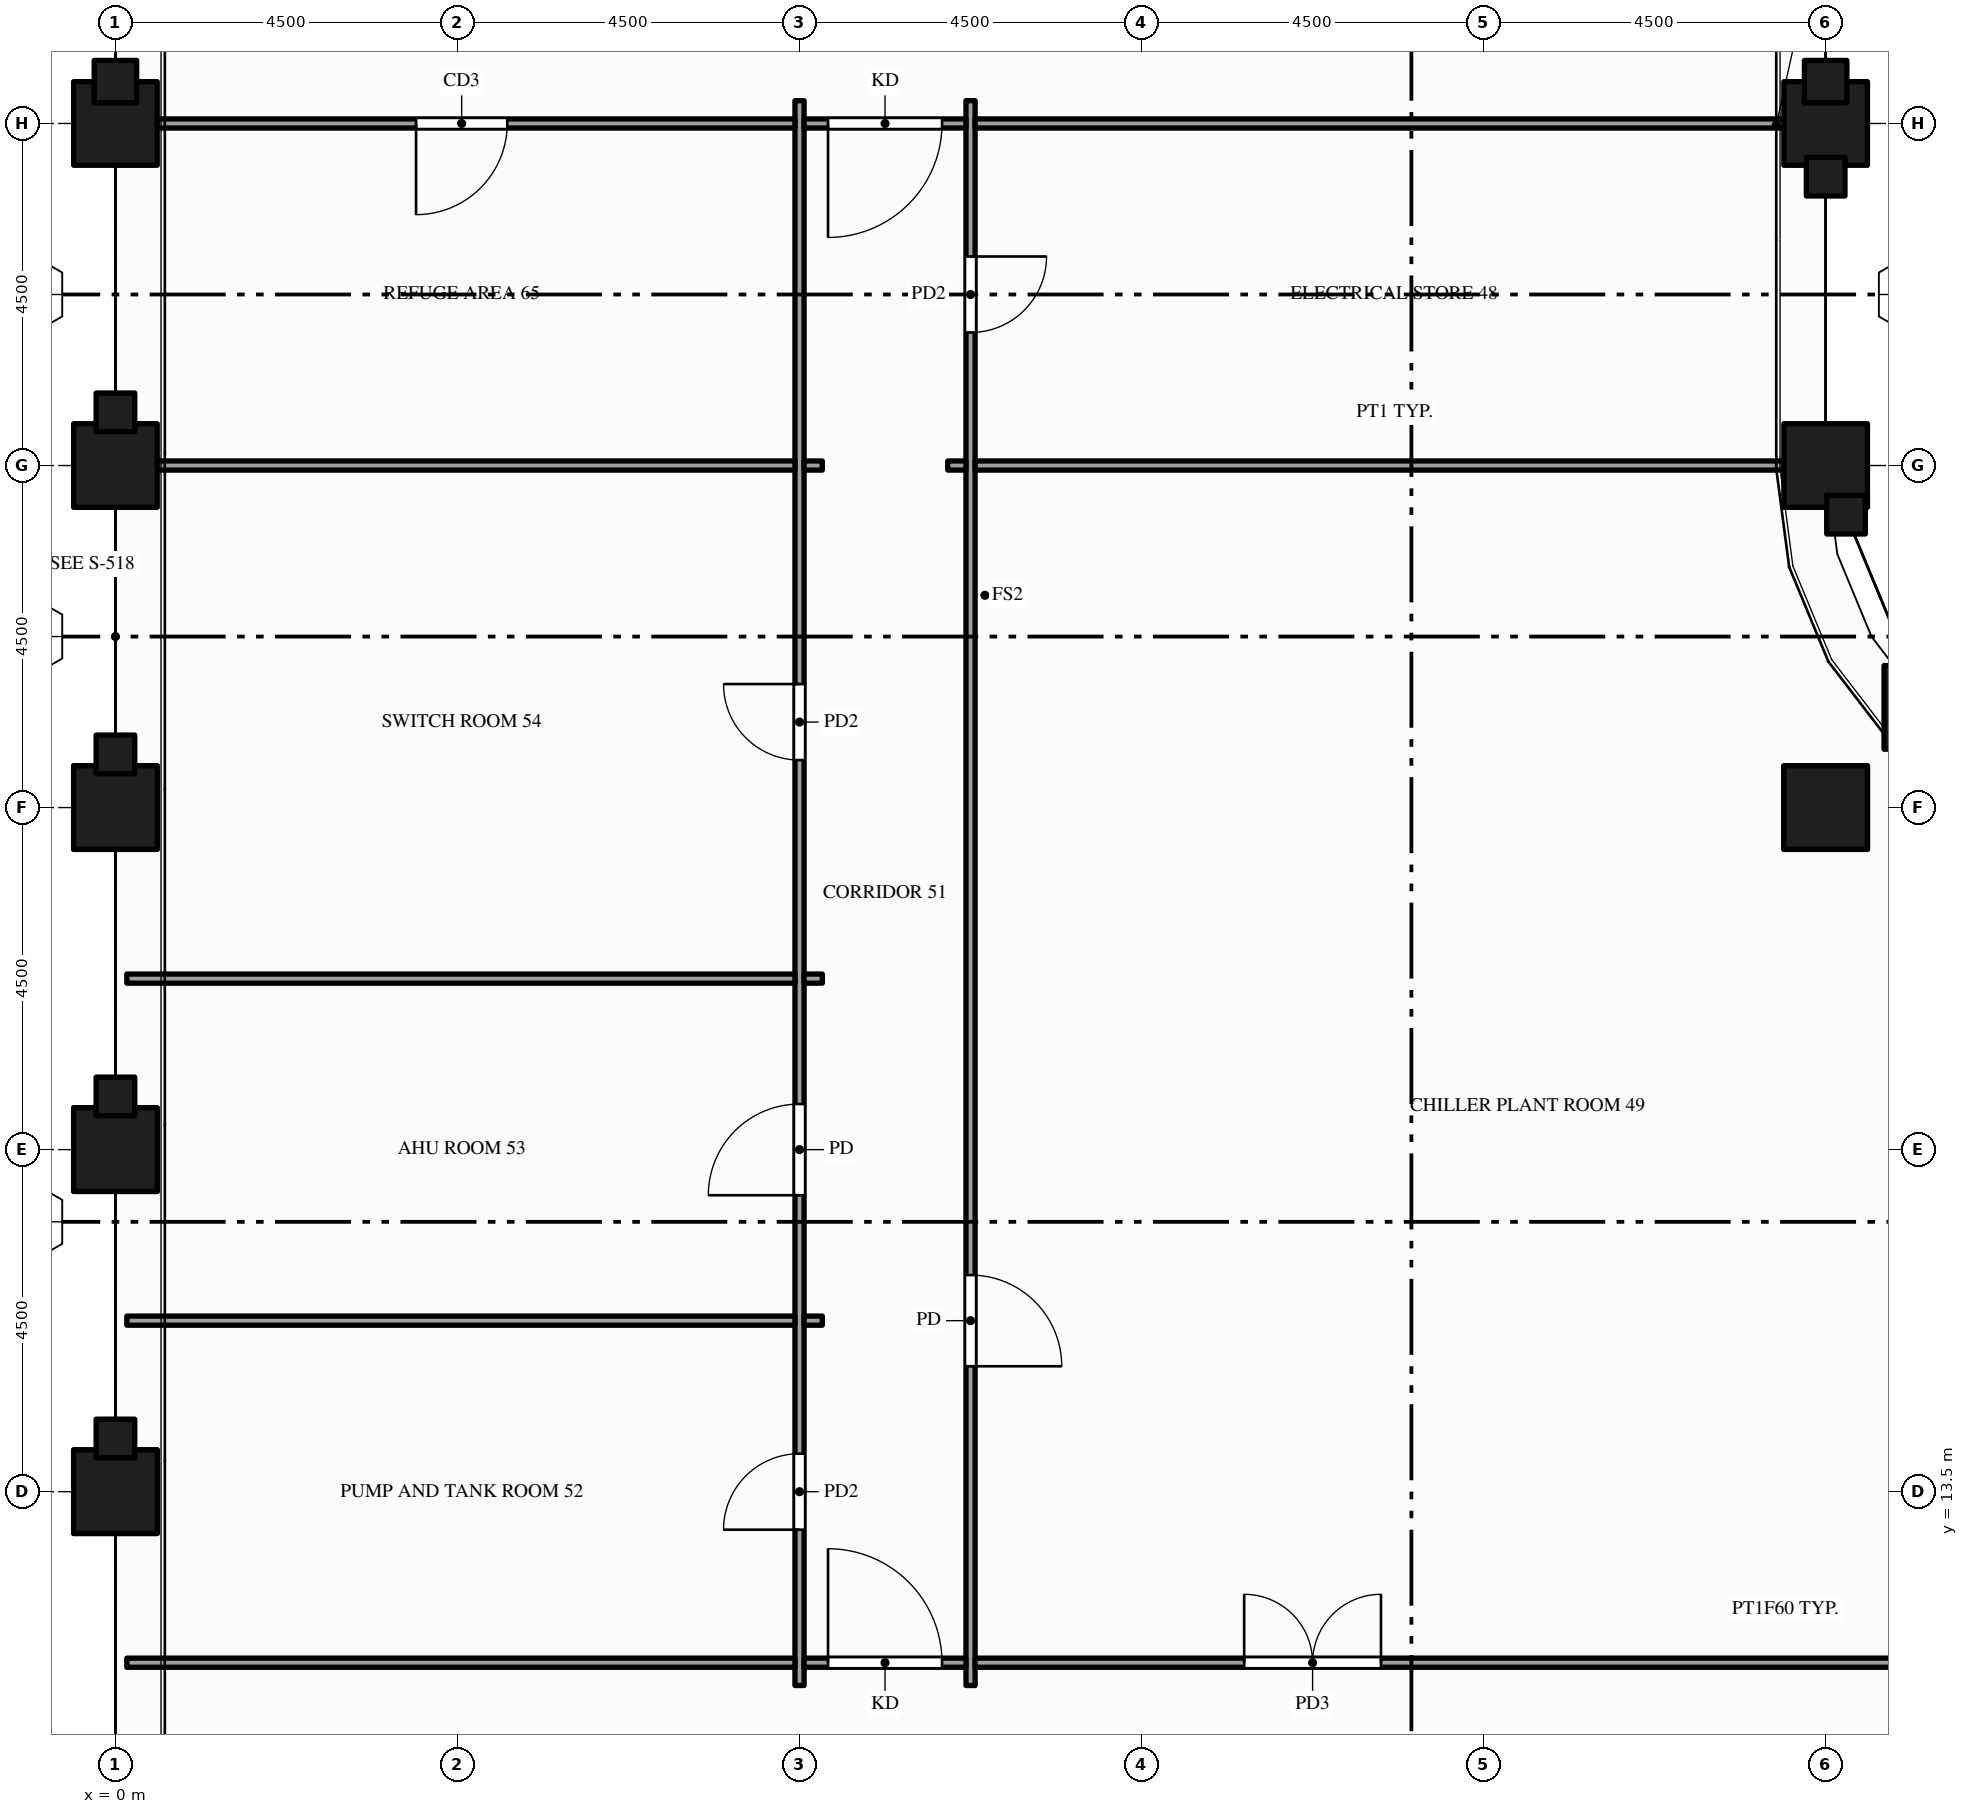
"""IFC4 building model, lengths in metres.
Left out: names, types, materials, properties, quantities, classifications, styles, units other than length and angle.
Written with IfcOpenShell. Run it as: python <this file> out.ifc"""

import sys

from ifc_helpers import new_model, si_unit, direction, frame, frame_2d, origin, origin_2d, place, context, subcontext, project, spatial, rectangle, hollow_rectangle, extrude, element, fill, save


model = new_model("IFC4")
c1 = context("Model", 3, precision=1e-05, world=origin(), true_north=direction((0.0, 1.0)))
c2 = subcontext(c1, "Body", "Model", "MODEL_VIEW")
j1 = project(units=[si_unit("LENGTHUNIT", "METRE"), si_unit("PLANEANGLEUNIT", "RADIAN")], contexts=[c1])
p1 = place(None, origin())
s1 = spatial("IfcSite", under=j1, at=p1, CompositionType="ELEMENT")
p2 = place(p1, origin())
s2 = spatial("IfcBuilding", under=s1, at=p2, CompositionType="ELEMENT")
p3 = place(p2, frame((0.0, 0.0, 77.0)))
s3 = spatial("IfcBuildingStorey", under=s2, at=p3, CompositionType="ELEMENT", Elevation=77.0)
p4 = place(p3, frame((0.0, 13.5, -0.25), z_axis=(0.0, 0.0, 1.0), x_axis=(1.0, 0.0, 0.0)))
e1 = element("IfcColumn", 1, at=p4, inside=s3, PredefinedType="COLUMN", context=c2, shape_type="SweptSolid", body=[
    extrude(hollow_rectangle(XDim=1.1, YDim=1.1, WallThickness=0.06, at=origin_2d()), origin(), (0.0, 0.0, 1.0), 4.6),
])
p5 = place(p3, frame((0.0, 13.5, 4.35), z_axis=(0.0, 0.0, 1.0), x_axis=(1.0, 0.0, 0.0)))
e2 = element("IfcColumn", 2, at=p5, inside=s3, PredefinedType="COLUMN", context=c2, shape_type="SweptSolid", body=[
    extrude(rectangle(XDim=1.1, YDim=1.1, at=origin_2d()), origin(), (0.0, 0.0, 1.0), 1.5),
])
p6 = place(p3, frame((0.0, 18.0, -0.25), z_axis=(0.0, 0.0, 1.0), x_axis=(1.0, 0.0, 0.0)))
e3 = element("IfcColumn", 3, at=p6, inside=s3, PredefinedType="COLUMN", context=c2, shape_type="SweptSolid", body=[
    extrude(hollow_rectangle(XDim=1.1, YDim=1.1, WallThickness=0.06, at=origin_2d()), origin(), (0.0, 0.0, 1.0), 4.6),
])
p7 = place(p3, frame((0.0, 18.0, 4.35), z_axis=(0.0, 0.0, 1.0), x_axis=(1.0, 0.0, 0.0)))
e4 = element("IfcColumn", 4, at=p7, inside=s3, PredefinedType="COLUMN", context=c2, shape_type="SweptSolid", body=[
    extrude(rectangle(XDim=1.1, YDim=1.1, at=origin_2d()), origin(), (0.0, 0.0, 1.0), 1.5),
])
p8 = place(p3, frame((0.0, 22.5, -0.25), z_axis=(0.0, 0.0, 1.0), x_axis=(1.0, 0.0, 0.0)))
e5 = element("IfcColumn", 5, at=p8, inside=s3, PredefinedType="COLUMN", context=c2, shape_type="SweptSolid", body=[
    extrude(hollow_rectangle(XDim=1.1, YDim=1.1, WallThickness=0.06, at=origin_2d()), origin(), (0.0, 0.0, 1.0), 4.6),
])
p9 = place(p3, frame((0.0, 22.5, 4.35), z_axis=(0.0, 0.0, 1.0), x_axis=(1.0, 0.0, 0.0)))
e6 = element("IfcColumn", 6, at=p9, inside=s3, PredefinedType="COLUMN", context=c2, shape_type="SweptSolid", body=[
    extrude(rectangle(XDim=1.1, YDim=1.1, at=origin_2d()), origin(), (0.0, 0.0, 1.0), 1.5),
])
for number, where, z_axis, x_axis in (
    (7, (0.0, 27.0, -0.25), (0.0, 0.0, 1.0), (1.0, 0.0, 0.0)),
    (8, (0.0, 31.5, -0.25), (0.0, 0.0, 1.0), (1.0, 0.0, 0.0)),
):
    element("IfcColumn", number, at=place(p3, frame(where, z_axis=z_axis, x_axis=x_axis)), inside=s3, PredefinedType="COLUMN", context=c2, shape_type="SweptSolid", body=[
        extrude(hollow_rectangle(XDim=1.1, YDim=1.1, WallThickness=0.06, at=origin_2d()), origin(), (0.0, 0.0, 1.0), 6.1),
    ])
p10 = place(p3, frame((22.5, 22.5, -0.25), z_axis=(0.0, 0.0, 1.0), x_axis=(1.0, 0.0, 0.0)))
e9 = element("IfcColumn", 9, at=p10, inside=s3, PredefinedType="COLUMN", context=c2, shape_type="SweptSolid", body=[
    extrude(hollow_rectangle(XDim=1.1, YDim=1.1, WallThickness=0.06, at=origin_2d()), origin(), (0.0, 0.0, 1.0), 4.6),
])
p11 = place(p3, frame((22.5, 22.5, 4.35), z_axis=(0.0, 0.0, 1.0), x_axis=(1.0, 0.0, 0.0)))
e10 = element("IfcColumn", 10, at=p11, inside=s3, PredefinedType="COLUMN", context=c2, shape_type="SweptSolid", body=[
    extrude(rectangle(XDim=1.1, YDim=1.1, at=origin_2d()), origin(), (0.0, 0.0, 1.0), 1.5),
])
for number, where, z_axis, x_axis in (
    (11, (22.5, 27.0, -0.25), (0.0, 0.0, 1.0), (1.0, 0.0, 0.0)),
    (12, (22.5, 31.5, -0.25), (0.0, 0.0, 1.0), (1.0, 0.0, 0.0)),
    (13, (23.818, 23.818, -0.25), (0.0, 0.0, 1.0), (1.0, 0.0, 0.0)),
):
    element("IfcColumn", number, at=place(p3, frame(where, z_axis=z_axis, x_axis=x_axis)), inside=s3, PredefinedType="COLUMN", context=c2, shape_type="SweptSolid", body=[
        extrude(hollow_rectangle(XDim=1.1, YDim=1.1, WallThickness=0.06, at=origin_2d()), origin(), (0.0, 0.0, 1.0), 6.1),
    ])
p12 = place(p3, frame((9.0, 10.95, 0.0), z_axis=(0.0, 0.0, 1.0), x_axis=(0.0, 1.0, 0.0)))
e14 = element("IfcWall", 14, at=p12, inside=s3, PredefinedType="PARTITIONING", context=c2, shape_type="SweptSolid", body=[
    extrude(rectangle(XDim=20.85, YDim=0.12, at=frame_2d((10.425, 0.0))), origin(), (0.0, 0.0, 1.0), 4.6),
])
p13 = place(p12, frame((2.05, 0.0, 0.0)))
e15 = element("IfcOpeningElement", 15, at=p13, cuts=e14, PredefinedType="OPENING", context=c2, shape_type="SweptSolid", body=[
    extrude(rectangle(XDim=1.0, YDim=2.1, at=frame_2d((0.5, 1.05))), frame((0.0, 0.07, 0.0), z_axis=(0.0, -1.0, 0.0), x_axis=(1.0, 0.0, 0.0)), (0.0, 0.0, 1.0), 0.14),
])
p14 = place(p12, frame((6.45, 0.0, 0.0)))
e16 = element("IfcOpeningElement", 16, at=p14, cuts=e14, PredefinedType="OPENING", context=c2, shape_type="SweptSolid", body=[
    extrude(rectangle(XDim=1.2, YDim=2.1, at=frame_2d((0.6, 1.05))), frame((0.0, 0.07, 0.0), z_axis=(0.0, -1.0, 0.0), x_axis=(1.0, 0.0, 0.0)), (0.0, 0.0, 1.0), 0.14),
])
p15 = place(p12, frame((12.175, 0.0, 0.0)))
e17 = element("IfcOpeningElement", 17, at=p15, cuts=e14, PredefinedType="OPENING", context=c2, shape_type="SweptSolid", body=[
    extrude(rectangle(XDim=1.0, YDim=2.1, at=frame_2d((0.5, 1.05))), frame((0.0, 0.07, 0.0), z_axis=(0.0, -1.0, 0.0), x_axis=(1.0, 0.0, 0.0)), (0.0, 0.0, 1.0), 0.14),
])
p16 = place(p3, frame((11.25, 10.95, 0.0), z_axis=(0.0, 0.0, 1.0), x_axis=(0.0, 1.0, 0.0)))
e18 = element("IfcWall", 18, at=p16, inside=s3, PredefinedType="PARTITIONING", context=c2, shape_type="SweptSolid", body=[
    extrude(rectangle(XDim=20.85, YDim=0.12, at=frame_2d((10.425, 0.0))), origin(), (0.0, 0.0, 1.0), 4.6),
])
p17 = place(p16, frame((17.8, 0.0, 0.0)))
e19 = element("IfcOpeningElement", 19, at=p17, cuts=e18, PredefinedType="OPENING", context=c2, shape_type="SweptSolid", body=[
    extrude(rectangle(XDim=1.0, YDim=2.1, at=frame_2d((0.5, 1.05))), frame((0.0, 0.07, 0.0), z_axis=(0.0, -1.0, 0.0), x_axis=(1.0, 0.0, 0.0)), (0.0, 0.0, 1.0), 0.14),
])
p18 = place(p16, frame((4.2, 0.0, 0.0)))
e20 = element("IfcOpeningElement", 20, at=p18, cuts=e18, PredefinedType="OPENING", context=c2, shape_type="SweptSolid", body=[
    extrude(rectangle(XDim=1.2, YDim=2.1, at=frame_2d((0.6, 1.05))), frame((0.0, 0.07, 0.0), z_axis=(0.0, -1.0, 0.0), x_axis=(1.0, 0.0, 0.0)), (0.0, 0.0, 1.0), 0.14),
])
p19 = place(p3, frame((0.15, 11.25, 0.0), z_axis=(0.0, 0.0, 1.0), x_axis=(1.0, 0.0, 0.0)))
e21 = element("IfcWall", 21, at=p19, inside=s3, PredefinedType="PARTITIONING", context=c2, shape_type="SweptSolid", body=[
    extrude(rectangle(XDim=8.79, YDim=0.12, at=frame_2d((4.395, 0.0))), origin(), (0.0, 0.0, 1.0), 4.938),
])
p20 = place(p3, frame((9.06, 11.25, 0.0), z_axis=(0.0, 0.0, 1.0), x_axis=(1.0, 0.0, 0.0)))
e22 = element("IfcWall", 22, at=p20, inside=s3, PredefinedType="PARTITIONING", context=c2, shape_type="SweptSolid", body=[
    extrude(rectangle(XDim=2.13, YDim=0.12, at=frame_2d((1.065, 0.0))), origin(), (0.0, 0.0, 1.0), 4.938),
])
p21 = place(p20, frame((0.315, 0.0, 0.0)))
e23 = element("IfcOpeningElement", 23, at=p21, cuts=e22, PredefinedType="OPENING", context=c2, shape_type="SweptSolid", body=[
    extrude(rectangle(XDim=1.5, YDim=2.1, at=frame_2d((0.75, 1.05))), frame((0.0, 0.07, 0.0), z_axis=(0.0, -1.0, 0.0), x_axis=(1.0, 0.0, 0.0)), (0.0, 0.0, 1.0), 0.14),
])
p22 = place(p3, frame((11.31, 11.25, 0.0), z_axis=(0.0, 0.0, 1.0), x_axis=(1.0, 0.0, 0.0)))
e24 = element("IfcWall", 24, at=p22, inside=s3, PredefinedType="PARTITIONING", context=c2, shape_type="SweptSolid", body=[
    extrude(rectangle(XDim=15.63, YDim=0.12, at=frame_2d((7.815, 0.0))), origin(), (0.0, 0.0, 1.0), 4.938),
])
p23 = place(p22, frame((3.54, 0.0, 0.0)))
e25 = element("IfcOpeningElement", 25, at=p23, cuts=e24, PredefinedType="OPENING", context=c2, shape_type="SweptSolid", body=[
    extrude(rectangle(XDim=1.8, YDim=2.1, at=frame_2d((0.9, 1.05))), frame((0.0, 0.07, 0.0), z_axis=(0.0, -1.0, 0.0), x_axis=(1.0, 0.0, 0.0)), (0.0, 0.0, 1.0), 0.14),
])
p24 = place(p3, frame((0.15, 15.75, 0.0), z_axis=(0.0, 0.0, 1.0), x_axis=(1.0, 0.0, 0.0)))
e26 = element("IfcWall", 26, at=p24, inside=s3, PredefinedType="PARTITIONING", context=c2, shape_type="SweptSolid", body=[
    extrude(rectangle(XDim=8.79, YDim=0.12, at=frame_2d((4.395, 0.0))), origin(), (0.0, 0.0, 1.0), 4.938),
])
p25 = place(p3, frame((9.06, 15.75, 0.0), z_axis=(0.0, 0.0, 1.0), x_axis=(1.0, 0.0, 0.0)))
e27 = element("IfcWall", 27, at=p25, inside=s3, PredefinedType="PARTITIONING", context=c2, shape_type="SweptSolid", body=[
    extrude(rectangle(XDim=0.24, YDim=0.12, at=frame_2d((0.12, 0.0))), origin(), (0.0, 0.0, 1.0), 4.938),
])
p26 = place(p3, frame((0.15, 20.25, 0.0), z_axis=(0.0, 0.0, 1.0), x_axis=(1.0, 0.0, 0.0)))
e28 = element("IfcWall", 28, at=p26, inside=s3, PredefinedType="PARTITIONING", context=c2, shape_type="SweptSolid", body=[
    extrude(rectangle(XDim=8.79, YDim=0.12, at=frame_2d((4.395, 0.0))), origin(), (0.0, 0.0, 1.0), 4.938),
])
p27 = place(p3, frame((9.06, 20.25, 0.0), z_axis=(0.0, 0.0, 1.0), x_axis=(1.0, 0.0, 0.0)))
e29 = element("IfcWall", 29, at=p27, inside=s3, PredefinedType="PARTITIONING", context=c2, shape_type="SweptSolid", body=[
    extrude(rectangle(XDim=0.24, YDim=0.12, at=frame_2d((0.12, 0.0))), origin(), (0.0, 0.0, 1.0), 4.938),
])
p28 = place(p3, frame((0.15, 27.0, 0.0), z_axis=(0.0, 0.0, 1.0), x_axis=(1.0, 0.0, 0.0)))
e30 = element("IfcWall", 30, at=p28, inside=s3, PredefinedType="PARTITIONING", context=c2, shape_type="SweptSolid", body=[
    extrude(rectangle(XDim=8.79, YDim=0.12, at=frame_2d((4.395, 0.0))), origin(), (0.0, 0.0, 1.0), 4.45),
])
for number, where, z_axis, x_axis in (
    (31, (9.06, 27.0, 0.0), (0.0, 0.0, 1.0), (1.0, 0.0, 0.0)),
    (32, (10.95, 27.0, 0.0), (0.0, 0.0, 1.0), (1.0, 0.0, 0.0)),
):
    element("IfcWall", number, at=place(p3, frame(where, z_axis=z_axis, x_axis=x_axis)), inside=s3, PredefinedType="PARTITIONING", context=c2, shape_type="SweptSolid", body=[
        extrude(rectangle(XDim=0.24, YDim=0.12, at=frame_2d((0.12, 0.0))), origin(), (0.0, 0.0, 1.0), 4.938),
    ])
p29 = place(p3, frame((11.31, 27.0, 0.0), z_axis=(0.0, 0.0, 1.0), x_axis=(1.0, 0.0, 0.0)))
e33 = element("IfcWall", 33, at=p29, inside=s3, PredefinedType="PARTITIONING", context=c2, shape_type="SweptSolid", body=[
    extrude(rectangle(XDim=11.04, YDim=0.12, at=frame_2d((5.52, 0.0))), origin(), (0.0, 0.0, 1.0), 4.938),
])
p30 = place(p3, frame((0.15, 31.5, 0.0), z_axis=(0.0, 0.0, 1.0), x_axis=(1.0, 0.0, 0.0)))
e34 = element("IfcWall", 34, at=p30, inside=s3, PredefinedType="PARTITIONING", context=c2, shape_type="SweptSolid", body=[
    extrude(rectangle(XDim=8.79, YDim=0.12, at=frame_2d((4.395, 0.0))), origin(), (0.0, 0.0, 1.0), 4.45),
])
p31 = place(p30, frame((3.805, 0.0, 0.0)))
e35 = element("IfcOpeningElement", 35, at=p31, cuts=e34, PredefinedType="OPENING", context=c2, shape_type="SweptSolid", body=[
    extrude(rectangle(XDim=1.2, YDim=2.1, at=frame_2d((0.6, 1.05))), frame((0.0, 0.07, 0.0), z_axis=(0.0, -1.0, 0.0), x_axis=(1.0, 0.0, 0.0)), (0.0, 0.0, 1.0), 0.14),
])
p32 = place(p3, frame((9.06, 31.5, 0.0), z_axis=(0.0, 0.0, 1.0), x_axis=(1.0, 0.0, 0.0)))
e36 = element("IfcWall", 36, at=p32, inside=s3, PredefinedType="PARTITIONING", context=c2, shape_type="SweptSolid", body=[
    extrude(rectangle(XDim=2.13, YDim=0.12, at=frame_2d((1.065, 0.0))), origin(), (0.0, 0.0, 1.0), 4.938),
])
p33 = place(p32, frame((0.315, 0.0, 0.0)))
e37 = element("IfcOpeningElement", 37, at=p33, cuts=e36, PredefinedType="OPENING", context=c2, shape_type="SweptSolid", body=[
    extrude(rectangle(XDim=1.5, YDim=2.1, at=frame_2d((0.75, 1.05))), frame((0.0, 0.07, 0.0), z_axis=(0.0, -1.0, 0.0), x_axis=(1.0, 0.0, 0.0)), (0.0, 0.0, 1.0), 0.14),
])
p34 = place(p3, frame((11.31, 31.5, 0.0), z_axis=(0.0, 0.0, 1.0), x_axis=(1.0, 0.0, 0.0)))
e38 = element("IfcWall", 38, at=p34, inside=s3, PredefinedType="PARTITIONING", context=c2, shape_type="SweptSolid", body=[
    extrude(rectangle(XDim=11.04, YDim=0.12, at=frame_2d((5.52, 0.0))), origin(), (0.0, 0.0, 1.0), 4.938),
])
p35 = place(p23, origin())
e39 = element("IfcDoor", 39, at=p35, inside=s3, OperationType="DOUBLE_DOOR_SINGLE_SWING", PredefinedType="DOOR", context=c2, shape_type="SweptSolid", body=[
    extrude(rectangle(XDim=1.8, YDim=2.1, at=frame_2d((0.9, 1.05))), frame((0.0, 0.025, 0.0), z_axis=(0.0, -1.0, 0.0), x_axis=(1.0, 0.0, 0.0)), (0.0, 0.0, 1.0), 0.05),
])
fill(e25, e39)
p36 = place(p21, origin())
e40 = element("IfcDoor", 40, at=p36, inside=s3, OperationType="SINGLE_SWING_LEFT", PredefinedType="DOOR", context=c2, shape_type="SweptSolid", body=[
    extrude(rectangle(XDim=1.5, YDim=2.1, at=frame_2d((0.75, 1.05))), frame((0.0, 0.025, 0.0), z_axis=(0.0, -1.0, 0.0), x_axis=(1.0, 0.0, 0.0)), (0.0, 0.0, 1.0), 0.05),
])
fill(e23, e40)
p37 = place(p33, origin())
e41 = element("IfcDoor", 41, at=p37, inside=s3, OperationType="SINGLE_SWING_LEFT", PredefinedType="DOOR", context=c2, shape_type="SweptSolid", body=[
    extrude(rectangle(XDim=1.5, YDim=2.1, at=frame_2d((0.75, 1.05))), frame((0.0, 0.025, 0.0), z_axis=(0.0, -1.0, 0.0), x_axis=(1.0, 0.0, 0.0)), (0.0, 0.0, 1.0), 0.05),
])
fill(e37, e41)
p38 = place(p13, origin())
e42 = element("IfcDoor", 42, at=p38, inside=s3, OperationType="SINGLE_SWING_LEFT", PredefinedType="DOOR", context=c2, shape_type="SweptSolid", body=[
    extrude(rectangle(XDim=1.0, YDim=2.1, at=frame_2d((0.5, 1.05))), frame((0.0, 0.025, 0.0), z_axis=(0.0, -1.0, 0.0), x_axis=(1.0, 0.0, 0.0)), (0.0, 0.0, 1.0), 0.05),
])
fill(e15, e42)
p39 = place(p14, origin())
e43 = element("IfcDoor", 43, at=p39, inside=s3, OperationType="SINGLE_SWING_LEFT", PredefinedType="DOOR", context=c2, shape_type="SweptSolid", body=[
    extrude(rectangle(XDim=1.2, YDim=2.1, at=frame_2d((0.6, 1.05))), frame((0.0, 0.025, 0.0), z_axis=(0.0, -1.0, 0.0), x_axis=(1.0, 0.0, 0.0)), (0.0, 0.0, 1.0), 0.05),
])
fill(e16, e43)
p40 = place(p15, origin())
e44 = element("IfcDoor", 44, at=p40, inside=s3, OperationType="SINGLE_SWING_RIGHT", PredefinedType="DOOR", context=c2, shape_type="SweptSolid", body=[
    extrude(rectangle(XDim=1.0, YDim=2.1, at=frame_2d((0.5, 1.05))), frame((0.0, 0.025, 0.0), z_axis=(0.0, -1.0, 0.0), x_axis=(1.0, 0.0, 0.0)), (0.0, 0.0, 1.0), 0.05),
])
fill(e17, e44)
p41 = place(p31, origin())
e45 = element("IfcDoor", 45, at=p41, inside=s3, OperationType="SINGLE_SWING_LEFT", PredefinedType="DOOR", context=c2, shape_type="SweptSolid", body=[
    extrude(rectangle(XDim=1.2, YDim=2.1, at=frame_2d((0.6, 1.05))), frame((0.0, 0.025, 0.0), z_axis=(0.0, -1.0, 0.0), x_axis=(1.0, 0.0, 0.0)), (0.0, 0.0, 1.0), 0.05),
])
fill(e35, e45)
p42 = place(p17, origin())
e46 = element("IfcDoor", 46, at=p42, inside=s3, OperationType="SINGLE_SWING_RIGHT", PredefinedType="DOOR", context=c2, shape_type="SweptSolid", body=[
    extrude(rectangle(XDim=1.0, YDim=2.1, at=frame_2d((0.5, 1.05))), frame((0.0, 0.025, 0.0), z_axis=(0.0, -1.0, 0.0), x_axis=(1.0, 0.0, 0.0)), (0.0, 0.0, 1.0), 0.05),
])
fill(e19, e46)
p43 = place(p18, origin())
e47 = element("IfcDoor", 47, at=p43, inside=s3, OperationType="SINGLE_SWING_LEFT", PredefinedType="DOOR", context=c2, shape_type="SweptSolid", body=[
    extrude(rectangle(XDim=1.2, YDim=2.1, at=frame_2d((0.6, 1.05))), frame((0.0, 0.025, 0.0), z_axis=(0.0, -1.0, 0.0), x_axis=(1.0, 0.0, 0.0)), (0.0, 0.0, 1.0), 0.05),
])
fill(e20, e47)
save(model, sys.argv[1])
